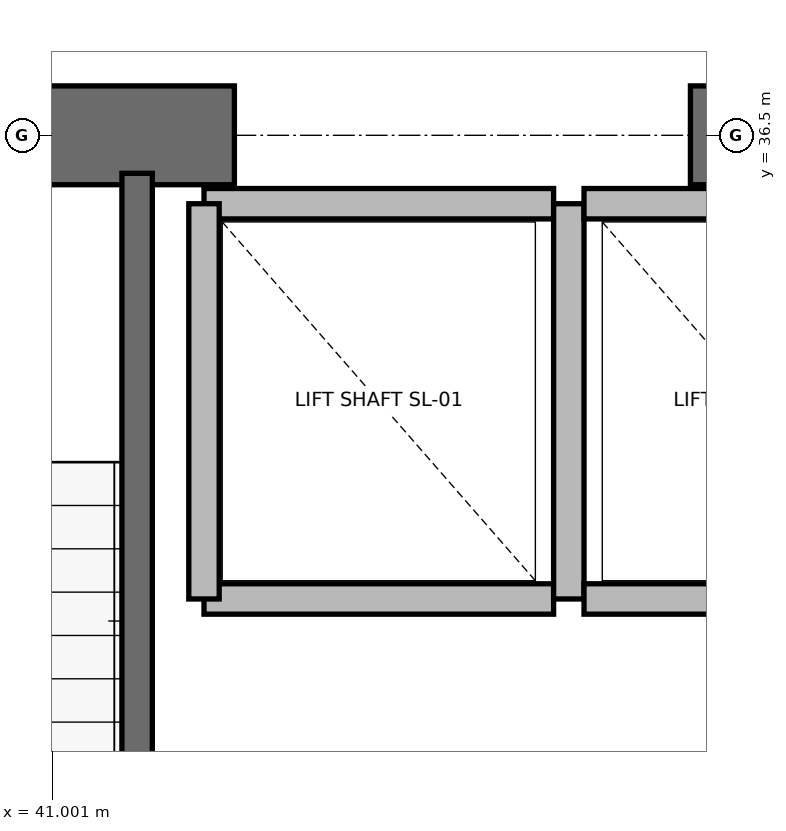
"""IFC4 building model, lengths in metres.
Left out: names, types, materials, properties, quantities, classifications, styles, units other than length and angle.
Written with IfcOpenShell. Run it as: python <this file> out.ifc"""

import sys

from ifc_helpers import new_model, si_unit, direction, frame, frame_2d, origin, place, context, subcontext, project, spatial, rectangle, extrude, element, save


model = new_model("IFC4")
c1 = context("Model", 3, precision=1e-05, world=origin(), true_north=direction((0.0, 1.0)))
c2 = subcontext(c1, "Body", "Model", "MODEL_VIEW")
j1 = project(units=[si_unit("LENGTHUNIT", "METRE"), si_unit("PLANEANGLEUNIT", "RADIAN")], contexts=[c1])
p1 = place(None, origin())
s1 = spatial("IfcSite", under=j1, at=p1, CompositionType="ELEMENT")
p2 = place(p1, origin())
s2 = spatial("IfcBuilding", under=s1, at=p2, CompositionType="ELEMENT")
p3 = place(p2, frame((0.0, 0.0, 55.6)))
s3 = spatial("IfcBuildingStorey", under=s2, at=p3, CompositionType="ELEMENT", Elevation=55.6)
p4 = place(p3, frame((37.8, 36.5, 0.0), z_axis=(0.0, 0.0, 1.0), x_axis=(1.0, 0.0, 0.0)))
e1 = element("IfcWall", 1, at=p4, inside=s3, PredefinedType="SHEAR", context=c2, shape_type="SweptSolid", body=[
    extrude(rectangle(XDim=4.4, YDim=0.65, at=frame_2d((2.2, 0.0))), origin(), (0.0, 0.0, 1.0), 3.76),
])
p5 = place(p4, frame((1.65, 0.0, 0.0)))
e2 = element("IfcOpeningElement", 2, at=p5, cuts=e1, PredefinedType="OPENING", context=c2, shape_type="SweptSolid", body=[
    extrude(rectangle(XDim=1.1, YDim=2.15, at=frame_2d((0.55, 1.075))), frame((0.0, 0.325, 0.0), z_axis=(0.0, -1.0, 0.0), x_axis=(1.0, 0.0, 0.0)), (0.0, 0.0, 1.0), 0.65),
])
p6 = place(p3, frame((45.2, 36.5, 0.0), z_axis=(0.0, 0.0, 1.0), x_axis=(1.0, 0.0, 0.0)))
e3 = element("IfcWall", 3, at=p6, inside=s3, PredefinedType="SHEAR", context=c2, shape_type="SweptSolid", body=[
    extrude(rectangle(XDim=5.8, YDim=0.65, at=frame_2d((2.9, 0.0))), origin(), (0.0, 0.0, 1.0), 3.76),
])
p7 = place(p3, frame((41.56, 27.68, 0.0), z_axis=(0.0, 0.0, 1.0), x_axis=(0.0, 1.0, 0.0)))
e4 = element("IfcWall", 4, at=p7, inside=s3, PredefinedType="SOLIDWALL", context=c2, shape_type="SweptSolid", body=[
    extrude(rectangle(XDim=8.57, YDim=0.2, at=frame_2d((4.285, 0.0))), origin(), (0.0, 0.0, 1.0), 3.76),
])
p8 = place(p3, frame((42.0, 33.45, 0.0), z_axis=(0.0, 0.0, 1.0), x_axis=(1.0, 0.0, 0.0)))
e5 = element("IfcWall", 5, at=p8, inside=s3, PredefinedType="SOLIDWALL", context=c2, shape_type="SweptSolid", body=[
    extrude(rectangle(XDim=2.3, YDim=0.2, at=frame_2d((1.15, 0.0))), origin(), (0.0, 0.0, 1.0), 3.76),
])
p9 = place(p3, frame((44.3, 36.05, 0.0), z_axis=(0.0, 0.0, 1.0), x_axis=(-1.0, 0.0, 0.0)))
e6 = element("IfcWall", 6, at=p9, inside=s3, PredefinedType="SOLIDWALL", context=c2, shape_type="SweptSolid", body=[
    extrude(rectangle(XDim=2.3, YDim=0.2, at=frame_2d((1.15, 0.0))), origin(), (0.0, 0.0, 1.0), 2.54),
])
for number, where, z_axis, x_axis in (
    (7, (42.0, 36.05, 0.0), (0.0, 0.0, 1.0), (0.0, -1.0, 0.0)),
    (8, (44.4, 33.45, 0.0), (0.0, 0.0, 1.0), (0.0, 1.0, 0.0)),
):
    element("IfcWall", number, at=place(p3, frame(where, z_axis=z_axis, x_axis=x_axis)), inside=s3, PredefinedType="SOLIDWALL", context=c2, shape_type="SweptSolid", body=[
        extrude(rectangle(XDim=2.6, YDim=0.2, at=frame_2d((1.3, 0.0))), origin(), (0.0, 0.0, 1.0), 2.54),
    ])
p10 = place(p3, frame((44.5, 33.45, 0.0), z_axis=(0.0, 0.0, 1.0), x_axis=(1.0, 0.0, 0.0)))
e9 = element("IfcWall", 9, at=p10, inside=s3, PredefinedType="SOLIDWALL", context=c2, shape_type="SweptSolid", body=[
    extrude(rectangle(XDim=2.3, YDim=0.2, at=frame_2d((1.15, 0.0))), origin(), (0.0, 0.0, 1.0), 3.76),
])
p11 = place(p3, frame((46.8, 36.05, 0.0), z_axis=(0.0, 0.0, 1.0), x_axis=(-1.0, 0.0, 0.0)))
e10 = element("IfcWall", 10, at=p11, inside=s3, PredefinedType="SOLIDWALL", context=c2, shape_type="SweptSolid", body=[
    extrude(rectangle(XDim=2.3, YDim=0.2, at=frame_2d((1.15, 0.0))), origin(), (0.0, 0.0, 1.0), 2.54),
])
save(model, sys.argv[1])
